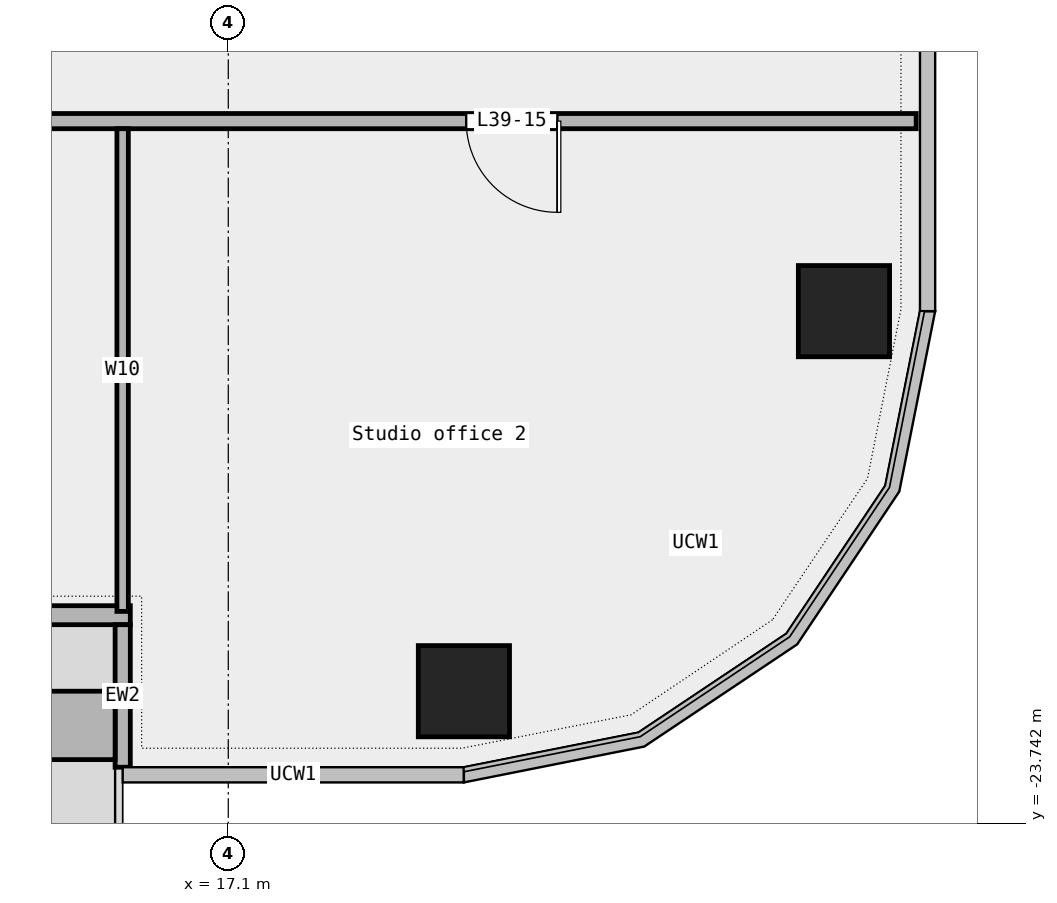
"""IFC4 building model, lengths in metres.
Left out: names, types, materials, properties, quantities, classifications, styles, units other than length and angle.
Written with IfcOpenShell. Run it as: python <this file> out.ifc"""

import sys

from ifc_helpers import new_model, si_unit, direction, frame, frame_2d, origin, origin_2d, place, context, subcontext, project, spatial, rectangle, extrude, element, fill, save


model = new_model("IFC4")
c1 = context("Model", 3, precision=1e-05, world=origin(), true_north=direction((0.0, 1.0)))
c2 = subcontext(c1, "Body", "Model", "MODEL_VIEW")
j1 = project(units=[si_unit("LENGTHUNIT", "METRE"), si_unit("PLANEANGLEUNIT", "RADIAN")], contexts=[c1])
p1 = place(None, origin())
s1 = spatial("IfcSite", under=j1, at=p1, CompositionType="ELEMENT")
p2 = place(p1, origin())
s2 = spatial("IfcBuilding", under=s1, at=p2, CompositionType="ELEMENT")
p3 = place(p2, frame((0.0, 0.0, 189.0)))
s3 = spatial("IfcBuildingStorey", under=s2, at=p3, CompositionType="ELEMENT", Elevation=189.0)
for number, where, z_axis, x_axis in (
    (1, (20.2, -22.0, 0.0), (0.0, 0.0, 1.0), (1.0, 0.0, 0.0)),
    (2, (25.2, -17.0, 0.0), (0.0, 0.0, 1.0), (1.0, 0.0, 0.0)),
):
    element("IfcColumn", number, at=place(p3, frame(where, z_axis=z_axis, x_axis=x_axis)), inside=s3, PredefinedType="COLUMN", context=c2, shape_type="SweptSolid", body=[
        extrude(rectangle(XDim=1.2, YDim=1.2, at=origin_2d()), origin(), (0.0, 0.0, 1.0), 3.6),
    ])
p4 = place(p3, frame((2.145, -21.0, 0.0), z_axis=(0.0, 0.0, 1.0), x_axis=(1.0, 0.0, 0.0)))
e3 = element("IfcWall", 3, at=p4, inside=s3, PredefinedType="STANDARD", context=c2, shape_type="SweptSolid", body=[
    extrude(rectangle(XDim=13.667, YDim=0.25, at=frame_2d((6.833, 0.0))), origin(), (0.0, 0.0, 1.0), 3.6),
])
p5 = place(p4, frame((1.75, 0.0, 0.45)))
e4 = element("IfcOpeningElement", 4, at=p5, cuts=e3, PredefinedType="OPENING", context=c2, shape_type="SweptSolid", body=[
    extrude(rectangle(XDim=1.5, YDim=2.4, at=frame_2d((0.75, 1.2))), frame((0.0, 0.137, 0.0), z_axis=(0.0, -1.0, 0.0), x_axis=(1.0, 0.0, 0.0)), (0.0, 0.0, 1.0), 0.274),
])
p6 = place(p4, frame((5.25, 0.0, 0.0)))
e5 = element("IfcOpeningElement", 5, at=p6, cuts=e3, PredefinedType="OPENING", context=c2, shape_type="SweptSolid", body=[
    extrude(rectangle(XDim=1.8, YDim=2.4, at=frame_2d((0.9, 1.2))), frame((0.0, 0.137, 0.0), z_axis=(0.0, -1.0, 0.0), x_axis=(1.0, 0.0, 0.0)), (0.0, 0.0, 1.0), 0.274),
])
p7 = place(p4, frame((10.5, 0.0, 0.45)))
e6 = element("IfcOpeningElement", 6, at=p7, cuts=e3, PredefinedType="OPENING", context=c2, shape_type="SweptSolid", body=[
    extrude(rectangle(XDim=1.5, YDim=2.4, at=frame_2d((0.75, 1.2))), frame((0.0, 0.137, 0.0), z_axis=(0.0, -1.0, 0.0), x_axis=(1.0, 0.0, 0.0)), (0.0, 0.0, 1.0), 0.274),
])
p8 = place(p3, frame((15.711, -23.0, 0.0), z_axis=(0.0, 0.0, 1.0), x_axis=(0.0, 1.0, 0.0)))
e7 = element("IfcWall", 7, at=p8, inside=s3, PredefinedType="STANDARD", context=c2, shape_type="SweptSolid", body=[
    extrude(rectangle(XDim=1.875, YDim=0.2, at=frame_2d((0.938, 0.0))), origin(), (0.0, 0.0, 1.0), 3.6),
])
p9 = place(p3, frame((12.011, -22.45, 0.0), z_axis=(0.0, 0.0, 1.0), x_axis=(1.0, 0.0, 0.0)))
e8 = element("IfcWall", 8, at=p9, inside=s3, PredefinedType="STANDARD", context=c2, shape_type="SweptSolid", body=[
    extrude(rectangle(XDim=3.6, YDim=0.9, at=frame_2d((1.8, 0.0))), origin(), (0.0, 0.0, 1.0), 0.7),
])
p10 = place(p3, frame((-26.15, -14.5, 0.0), z_axis=(0.0, 0.0, 1.0), x_axis=(1.0, 0.0, 0.0)))
e9 = element("IfcWall", 9, at=p10, inside=s3, PredefinedType="PARTITIONING", context=c2, shape_type="SweptSolid", body=[
    extrude(rectangle(XDim=52.3, YDim=0.2, at=frame_2d((26.15, 0.0))), origin(), (0.0, 0.0, 1.0), 3.6),
])
p11 = place(p10, frame((34.528, 0.0, 0.0)))
e10 = element("IfcOpeningElement", 10, at=p11, cuts=e9, PredefinedType="OPENING", context=c2, shape_type="SweptSolid", body=[
    extrude(rectangle(XDim=1.2, YDim=2.1, at=frame_2d((0.6, 1.05))), frame((0.0, 0.112, 0.0), z_axis=(0.0, -1.0, 0.0), x_axis=(1.0, 0.0, 0.0)), (0.0, 0.0, 1.0), 0.224),
])
p12 = place(p10, frame((13.397, 0.0, 0.0)))
e11 = element("IfcOpeningElement", 11, at=p12, cuts=e9, PredefinedType="OPENING", context=c2, shape_type="SweptSolid", body=[
    extrude(rectangle(XDim=1.8, YDim=2.1, at=frame_2d((0.9, 1.05))), frame((0.0, 0.112, 0.0), z_axis=(0.0, -1.0, 0.0), x_axis=(1.0, 0.0, 0.0)), (0.0, 0.0, 1.0), 0.224),
])
p13 = place(p10, frame((46.38, 0.0, 0.0)))
e12 = element("IfcOpeningElement", 12, at=p13, cuts=e9, PredefinedType="OPENING", context=c2, shape_type="SweptSolid", body=[
    extrude(rectangle(XDim=1.2, YDim=2.1, at=frame_2d((0.6, 1.05))), frame((0.0, 0.112, 0.0), z_axis=(0.0, -1.0, 0.0), x_axis=(1.0, 0.0, 0.0)), (0.0, 0.0, 1.0), 0.224),
])
p14 = place(p3, frame((15.71, -20.95, 0.0), z_axis=(0.0, 0.0, 1.0), x_axis=(0.0, 1.0, 0.0)))
e13 = element("IfcWall", 13, at=p14, inside=s3, PredefinedType="PARTITIONING", context=c2, shape_type="SweptSolid", body=[
    extrude(rectangle(XDim=6.35, YDim=0.15, at=frame_2d((3.175, 0.0))), origin(), (0.0, 0.0, 1.0), 3.6),
])
p15 = place(p13, origin())
e14 = element("IfcDoor", 14, at=p15, inside=s3, OperationType="SINGLE_SWING_LEFT", PredefinedType="DOOR", context=c2, shape_type="SweptSolid", body=[
    extrude(rectangle(XDim=1.2, YDim=2.1, at=frame_2d((0.6, 1.05))), frame((0.0, 0.025, 0.0), z_axis=(0.0, -1.0, 0.0), x_axis=(1.0, 0.0, 0.0)), (0.0, 0.0, 1.0), 0.05),
])
fill(e12, e14)
save(model, sys.argv[1])
